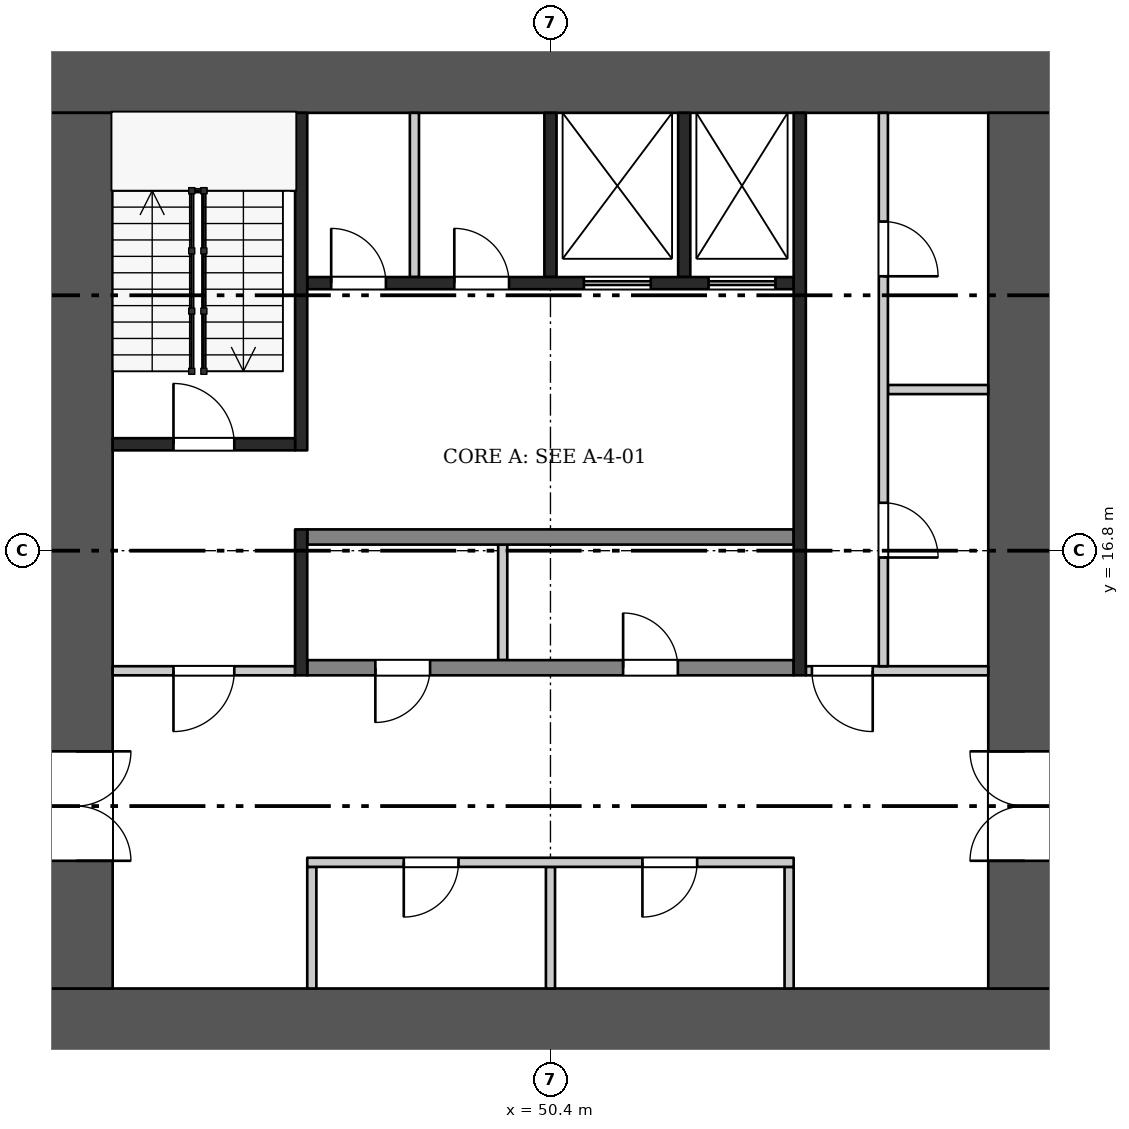
"""IFC4 building model, lengths in metres.
Left out: names, types, materials, properties, quantities, classifications, styles, units other than length and angle.
Written with IfcOpenShell. Run it as: python <this file> out.ifc"""

import sys

from ifc_helpers import new_model, si_unit, direction, frame, frame_2d, origin, place, context, subcontext, project, spatial, rectangle, extrude, element, fill, save


model = new_model("IFC4")
c1 = context("Model", 3, precision=1e-05, world=origin(), true_north=direction((0.0, 1.0)))
c2 = subcontext(c1, "Body", "Model", "MODEL_VIEW")
j1 = project(units=[si_unit("LENGTHUNIT", "METRE"), si_unit("PLANEANGLEUNIT", "RADIAN")], contexts=[c1])
p1 = place(None, origin())
s1 = spatial("IfcSite", under=j1, at=p1, CompositionType="ELEMENT")
p2 = place(p1, origin())
s2 = spatial("IfcBuilding", under=s1, at=p2, CompositionType="ELEMENT")
p3 = place(p2, frame((0.0, 0.0, -16.0)))
s3 = spatial("IfcBuildingStorey", under=s2, at=p3, CompositionType="ELEMENT", Elevation=-16.0)
for number, where, z_axis, x_axis in (
    (1, (42.0, 9.0, 0.0), (0.0, 0.0, 1.0), (1.0, 0.0, 0.0)),
    (2, (42.0, 24.6, 0.0), (0.0, 0.0, 1.0), (1.0, 0.0, 0.0)),
):
    element("IfcWall", number, at=place(p3, frame(where, z_axis=z_axis, x_axis=x_axis)), inside=s3, PredefinedType="SHEAR", context=c2, shape_type="SweptSolid", body=[
        extrude(rectangle(XDim=16.8, YDim=1.2, at=frame_2d((8.4, 0.0))), origin(), (0.0, 0.0, 1.0), 3.7),
    ])
p4 = place(p3, frame((42.6, 9.6, 0.0), z_axis=(0.0, 0.0, 1.0), x_axis=(0.0, 1.0, 0.0)))
e3 = element("IfcWall", 3, at=p4, inside=s3, PredefinedType="SHEAR", context=c2, shape_type="SweptSolid", body=[
    extrude(rectangle(XDim=14.4, YDim=1.2, at=frame_2d((7.2, 0.0))), origin(), (0.0, 0.0, 1.0), 3.7),
])
p5 = place(p4, frame((2.1, 0.0, 0.0)))
e4 = element("IfcOpeningElement", 4, at=p5, cuts=e3, PredefinedType="OPENING", context=c2, shape_type="SweptSolid", body=[
    extrude(rectangle(XDim=1.8, YDim=2.1, at=frame_2d((0.9, 1.05))), frame((0.0, 0.61, 0.0), z_axis=(0.0, -1.0, 0.0), x_axis=(1.0, 0.0, 0.0)), (0.0, 0.0, 1.0), 1.22),
])
p6 = place(p3, frame((58.2, 9.6, 0.0), z_axis=(0.0, 0.0, 1.0), x_axis=(0.0, 1.0, 0.0)))
e5 = element("IfcWall", 5, at=p6, inside=s3, PredefinedType="SHEAR", context=c2, shape_type="SweptSolid", body=[
    extrude(rectangle(XDim=14.4, YDim=1.2, at=frame_2d((7.2, 0.0))), origin(), (0.0, 0.0, 1.0), 3.7),
])
p7 = place(p6, frame((2.1, 0.0, 0.0)))
e6 = element("IfcOpeningElement", 6, at=p7, cuts=e5, PredefinedType="OPENING", context=c2, shape_type="SweptSolid", body=[
    extrude(rectangle(XDim=1.8, YDim=2.1, at=frame_2d((0.9, 1.05))), frame((0.0, 0.61, 0.0), z_axis=(0.0, -1.0, 0.0), x_axis=(1.0, 0.0, 0.0)), (0.0, 0.0, 1.0), 1.22),
])
for number, where, z_axis, x_axis in (
    (7, (46.475, 9.6, 0.0), (0.0, 0.0, 1.0), (0.0, 1.0, 0.0)),
    (8, (54.325, 9.6, 0.0), (0.0, 0.0, 1.0), (0.0, 1.0, 0.0)),
    (9, (50.4, 9.6, 0.0), (0.0, 0.0, 1.0), (0.0, 1.0, 0.0)),
):
    element("IfcWall", number, at=place(p3, frame(where, z_axis=z_axis, x_axis=x_axis)), inside=s3, PredefinedType="PARTITIONING", context=c2, shape_type="SweptSolid", body=[
        extrude(rectangle(XDim=2.0, YDim=0.15, at=frame_2d((1.0, 0.0))), origin(), (0.0, 0.0, 1.0), 3.7),
    ])
p8 = place(p3, frame((46.4, 11.675, 0.0), z_axis=(0.0, 0.0, 1.0), x_axis=(1.0, 0.0, 0.0)))
e10 = element("IfcWall", 10, at=p8, inside=s3, PredefinedType="PARTITIONING", context=c2, shape_type="SweptSolid", body=[
    extrude(rectangle(XDim=8.0, YDim=0.15, at=frame_2d((4.0, 0.0))), origin(), (0.0, 0.0, 1.0), 3.7),
])
p9 = place(p8, frame((1.587, 0.0, 0.0)))
e11 = element("IfcOpeningElement", 11, at=p9, cuts=e10, PredefinedType="OPENING", context=c2, shape_type="SweptSolid", body=[
    extrude(rectangle(XDim=0.9, YDim=2.1, at=frame_2d((0.45, 1.05))), frame((0.0, 0.085, 0.0), z_axis=(0.0, -1.0, 0.0), x_axis=(1.0, 0.0, 0.0)), (0.0, 0.0, 1.0), 0.17),
])
p10 = place(p8, frame((5.512, 0.0, 0.0)))
e12 = element("IfcOpeningElement", 12, at=p10, cuts=e10, PredefinedType="OPENING", context=c2, shape_type="SweptSolid", body=[
    extrude(rectangle(XDim=0.9, YDim=2.1, at=frame_2d((0.45, 1.05))), frame((0.0, 0.085, 0.0), z_axis=(0.0, -1.0, 0.0), x_axis=(1.0, 0.0, 0.0)), (0.0, 0.0, 1.0), 0.17),
])
p11 = place(p3, frame((49.615, 15.0, 0.0), z_axis=(0.0, 0.0, 1.0), x_axis=(0.0, 1.0, 0.0)))
e13 = element("IfcWall", 13, at=p11, inside=s3, PredefinedType="PARTITIONING", context=c2, shape_type="SweptSolid", body=[
    extrude(rectangle(XDim=1.9, YDim=0.15, at=frame_2d((0.95, 0.0))), origin(), (0.0, 0.0, 1.0), 3.7),
])
p12 = place(p3, frame((46.4, 14.875, 0.0), z_axis=(0.0, 0.0, 1.0), x_axis=(1.0, 0.0, 0.0)))
e14 = element("IfcWall", 14, at=p12, inside=s3, PredefinedType="SHEAR", context=c2, shape_type="SweptSolid", body=[
    extrude(rectangle(XDim=8.0, YDim=0.25, at=frame_2d((4.0, 0.0))), origin(), (0.0, 0.0, 1.0), 3.7),
])
p13 = place(p12, frame((1.12, 0.0, 0.0)))
e15 = element("IfcOpeningElement", 15, at=p13, cuts=e14, PredefinedType="OPENING", context=c2, shape_type="SweptSolid", body=[
    extrude(rectangle(XDim=0.9, YDim=2.1, at=frame_2d((0.45, 1.05))), frame((0.0, 0.135, 0.0), z_axis=(0.0, -1.0, 0.0), x_axis=(1.0, 0.0, 0.0)), (0.0, 0.0, 1.0), 0.27),
])
p14 = place(p12, frame((5.195, 0.0, 0.0)))
e16 = element("IfcOpeningElement", 16, at=p14, cuts=e14, PredefinedType="OPENING", context=c2, shape_type="SweptSolid", body=[
    extrude(rectangle(XDim=0.9, YDim=2.1, at=frame_2d((0.45, 1.05))), frame((0.0, 0.135, 0.0), z_axis=(0.0, -1.0, 0.0), x_axis=(1.0, 0.0, 0.0)), (0.0, 0.0, 1.0), 0.27),
])
p15 = place(p3, frame((46.4, 17.025, 0.0), z_axis=(0.0, 0.0, 1.0), x_axis=(1.0, 0.0, 0.0)))
e17 = element("IfcWall", 17, at=p15, inside=s3, PredefinedType="SHEAR", context=c2, shape_type="SweptSolid", body=[
    extrude(rectangle(XDim=8.0, YDim=0.25, at=frame_2d((4.0, 0.0))), origin(), (0.0, 0.0, 1.0), 3.7),
])
for number, where, z_axis, x_axis in (
    (18, (50.4, 21.3, 0.0), (0.0, 0.0, 1.0), (0.0, 1.0, 0.0)),
    (19, (52.6, 21.3, 0.0), (0.0, 0.0, 1.0), (0.0, 1.0, 0.0)),
):
    element("IfcWall", number, at=place(p3, frame(where, z_axis=z_axis, x_axis=x_axis)), inside=s3, PredefinedType="SHEAR", context=c2, shape_type="SweptSolid", body=[
        extrude(rectangle(XDim=2.7, YDim=0.2, at=frame_2d((1.35, 0.0))), origin(), (0.0, 0.0, 1.0), 3.7),
    ])
p16 = place(p3, frame((48.163, 21.3, 0.0), z_axis=(0.0, 0.0, 1.0), x_axis=(0.0, 1.0, 0.0)))
e20 = element("IfcWall", 20, at=p16, inside=s3, PredefinedType="PARTITIONING", context=c2, shape_type="SweptSolid", body=[
    extrude(rectangle(XDim=2.7, YDim=0.15, at=frame_2d((1.35, 0.0))), origin(), (0.0, 0.0, 1.0), 3.7),
])
p17 = place(p3, frame((46.4, 21.2, 0.0), z_axis=(0.0, 0.0, 1.0), x_axis=(1.0, 0.0, 0.0)))
e21 = element("IfcWall", 21, at=p17, inside=s3, PredefinedType="SHEAR", context=c2, shape_type="SweptSolid", body=[
    extrude(rectangle(XDim=8.0, YDim=0.2, at=frame_2d((4.0, 0.0))), origin(), (0.0, 0.0, 1.0), 3.7),
])
p18 = place(p17, frame((0.394, 0.0, 0.0)))
e22 = element("IfcOpeningElement", 22, at=p18, cuts=e21, PredefinedType="OPENING", context=c2, shape_type="SweptSolid", body=[
    extrude(rectangle(XDim=0.9, YDim=2.1, at=frame_2d((0.45, 1.05))), frame((0.0, 0.11, 0.0), z_axis=(0.0, -1.0, 0.0), x_axis=(1.0, 0.0, 0.0)), (0.0, 0.0, 1.0), 0.22),
])
p19 = place(p17, frame((2.419, 0.0, 0.0)))
e23 = element("IfcOpeningElement", 23, at=p19, cuts=e21, PredefinedType="OPENING", context=c2, shape_type="SweptSolid", body=[
    extrude(rectangle(XDim=0.9, YDim=2.1, at=frame_2d((0.45, 1.05))), frame((0.0, 0.11, 0.0), z_axis=(0.0, -1.0, 0.0), x_axis=(1.0, 0.0, 0.0)), (0.0, 0.0, 1.0), 0.22),
])
p20 = place(p17, frame((4.55, 0.0, 0.0)))
e24 = element("IfcOpeningElement", 24, at=p20, cuts=e21, PredefinedType="OPENING", context=c2, shape_type="SweptSolid", body=[
    extrude(rectangle(XDim=1.1, YDim=2.1, at=frame_2d((0.55, 1.05))), frame((0.0, 0.11, 0.0), z_axis=(0.0, -1.0, 0.0), x_axis=(1.0, 0.0, 0.0)), (0.0, 0.0, 1.0), 0.22),
])
p21 = place(p17, frame((6.6, 0.0, 0.0)))
e25 = element("IfcOpeningElement", 25, at=p21, cuts=e21, PredefinedType="OPENING", context=c2, shape_type="SweptSolid", body=[
    extrude(rectangle(XDim=1.1, YDim=2.1, at=frame_2d((0.55, 1.05))), frame((0.0, 0.11, 0.0), z_axis=(0.0, -1.0, 0.0), x_axis=(1.0, 0.0, 0.0)), (0.0, 0.0, 1.0), 0.22),
])
p22 = place(p3, frame((46.3, 14.75, 0.0), z_axis=(0.0, 0.0, 1.0), x_axis=(0.0, 1.0, 0.0)))
e26 = element("IfcWall", 26, at=p22, inside=s3, PredefinedType="SHEAR", context=c2, shape_type="SweptSolid", body=[
    extrude(rectangle(XDim=2.4, YDim=0.2, at=frame_2d((1.2, 0.0))), origin(), (0.0, 0.0, 1.0), 3.7),
])
p23 = place(p3, frame((46.3, 18.45, 0.0), z_axis=(0.0, 0.0, 1.0), x_axis=(0.0, 1.0, 0.0)))
e27 = element("IfcWall", 27, at=p23, inside=s3, PredefinedType="SHEAR", context=c2, shape_type="SweptSolid", body=[
    extrude(rectangle(XDim=5.55, YDim=0.2, at=frame_2d((2.775, 0.0))), origin(), (0.0, 0.0, 1.0), 3.7),
])
p24 = place(p3, frame((43.2, 14.825, 0.0), z_axis=(0.0, 0.0, 1.0), x_axis=(1.0, 0.0, 0.0)))
e28 = element("IfcWall", 28, at=p24, inside=s3, PredefinedType="PARTITIONING", context=c2, shape_type="SweptSolid", body=[
    extrude(rectangle(XDim=3.0, YDim=0.15, at=frame_2d((1.5, 0.0))), origin(), (0.0, 0.0, 1.0), 3.7),
])
p25 = place(p24, frame((1.0, 0.0, 0.0)))
e29 = element("IfcOpeningElement", 29, at=p25, cuts=e28, PredefinedType="OPENING", context=c2, shape_type="SweptSolid", body=[
    extrude(rectangle(XDim=1.0, YDim=2.1, at=frame_2d((0.5, 1.05))), frame((0.0, 0.085, 0.0), z_axis=(0.0, -1.0, 0.0), x_axis=(1.0, 0.0, 0.0)), (0.0, 0.0, 1.0), 0.17),
])
p26 = place(p3, frame((43.2, 18.55, 0.0), z_axis=(0.0, 0.0, 1.0), x_axis=(1.0, 0.0, 0.0)))
e30 = element("IfcWall", 30, at=p26, inside=s3, PredefinedType="SHEAR", context=c2, shape_type="SweptSolid", body=[
    extrude(rectangle(XDim=3.0, YDim=0.2, at=frame_2d((1.5, 0.0))), origin(), (0.0, 0.0, 1.0), 3.7),
])
p27 = place(p26, frame((1.0, 0.0, 0.0)))
e31 = element("IfcOpeningElement", 31, at=p27, cuts=e30, PredefinedType="OPENING", context=c2, shape_type="SweptSolid", body=[
    extrude(rectangle(XDim=1.0, YDim=2.1, at=frame_2d((0.5, 1.05))), frame((0.0, 0.11, 0.0), z_axis=(0.0, -1.0, 0.0), x_axis=(1.0, 0.0, 0.0)), (0.0, 0.0, 1.0), 0.22),
])
p28 = place(p3, frame((54.5, 14.75, 0.0), z_axis=(0.0, 0.0, 1.0), x_axis=(0.0, 1.0, 0.0)))
e32 = element("IfcWall", 32, at=p28, inside=s3, PredefinedType="SHEAR", context=c2, shape_type="SweptSolid", body=[
    extrude(rectangle(XDim=9.25, YDim=0.2, at=frame_2d((4.625, 0.0))), origin(), (0.0, 0.0, 1.0), 3.7),
])
p29 = place(p3, frame((54.6, 14.825, 0.0), z_axis=(0.0, 0.0, 1.0), x_axis=(1.0, 0.0, 0.0)))
e33 = element("IfcWall", 33, at=p29, inside=s3, PredefinedType="PARTITIONING", context=c2, shape_type="SweptSolid", body=[
    extrude(rectangle(XDim=3.0, YDim=0.15, at=frame_2d((1.5, 0.0))), origin(), (0.0, 0.0, 1.0), 3.7),
])
p30 = place(p29, frame((0.1, 0.0, 0.0)))
e34 = element("IfcOpeningElement", 34, at=p30, cuts=e33, PredefinedType="OPENING", context=c2, shape_type="SweptSolid", body=[
    extrude(rectangle(XDim=1.0, YDim=2.1, at=frame_2d((0.5, 1.05))), frame((0.0, 0.085, 0.0), z_axis=(0.0, -1.0, 0.0), x_axis=(1.0, 0.0, 0.0)), (0.0, 0.0, 1.0), 0.17),
])
p31 = place(p3, frame((55.95, 19.45, 0.0), z_axis=(0.0, 0.0, 1.0), x_axis=(1.0, 0.0, 0.0)))
e35 = element("IfcWall", 35, at=p31, inside=s3, PredefinedType="PARTITIONING", context=c2, shape_type="SweptSolid", body=[
    extrude(rectangle(XDim=1.65, YDim=0.15, at=frame_2d((0.825, 0.0))), origin(), (0.0, 0.0, 1.0), 3.7),
])
p32 = place(p3, frame((55.875, 14.9, 0.0), z_axis=(0.0, 0.0, 1.0), x_axis=(0.0, 1.0, 0.0)))
e36 = element("IfcWall", 36, at=p32, inside=s3, PredefinedType="PARTITIONING", context=c2, shape_type="SweptSolid", body=[
    extrude(rectangle(XDim=9.1, YDim=0.15, at=frame_2d((4.55, 0.0))), origin(), (0.0, 0.0, 1.0), 3.7),
])
p33 = place(p32, frame((1.788, 0.0, 0.0)))
e37 = element("IfcOpeningElement", 37, at=p33, cuts=e36, PredefinedType="OPENING", context=c2, shape_type="SweptSolid", body=[
    extrude(rectangle(XDim=0.9, YDim=2.1, at=frame_2d((0.45, 1.05))), frame((0.0, 0.085, 0.0), z_axis=(0.0, -1.0, 0.0), x_axis=(1.0, 0.0, 0.0)), (0.0, 0.0, 1.0), 0.17),
])
p34 = place(p32, frame((6.413, 0.0, 0.0)))
e38 = element("IfcOpeningElement", 38, at=p34, cuts=e36, PredefinedType="OPENING", context=c2, shape_type="SweptSolid", body=[
    extrude(rectangle(XDim=0.9, YDim=2.1, at=frame_2d((0.45, 1.05))), frame((0.0, 0.085, 0.0), z_axis=(0.0, -1.0, 0.0), x_axis=(1.0, 0.0, 0.0)), (0.0, 0.0, 1.0), 0.17),
])
p35 = place(p5, frame((1.8, 0.0, 0.0), z_axis=(0.0, 0.0, 1.0), x_axis=(-1.0, 0.0, 0.0)))
e39 = element("IfcDoor", 39, at=p35, inside=s3, OperationType="DOUBLE_DOOR_SINGLE_SWING", PredefinedType="DOOR", context=c2, shape_type="SweptSolid", body=[
    extrude(rectangle(XDim=1.8, YDim=2.1, at=frame_2d((0.9, 1.05))), frame((0.0, 0.025, 0.0), z_axis=(0.0, -1.0, 0.0), x_axis=(1.0, 0.0, 0.0)), (0.0, 0.0, 1.0), 0.05),
])
fill(e4, e39)
p36 = place(p7, origin())
e40 = element("IfcDoor", 40, at=p36, inside=s3, OperationType="DOUBLE_DOOR_SINGLE_SWING", PredefinedType="DOOR", context=c2, shape_type="SweptSolid", body=[
    extrude(rectangle(XDim=1.8, YDim=2.1, at=frame_2d((0.9, 1.05))), frame((0.0, 0.025, 0.0), z_axis=(0.0, -1.0, 0.0), x_axis=(1.0, 0.0, 0.0)), (0.0, 0.0, 1.0), 0.05),
])
fill(e6, e40)
p37 = place(p9, frame((0.9, 0.0, 0.0), z_axis=(0.0, 0.0, 1.0), x_axis=(-1.0, 0.0, 0.0)))
e41 = element("IfcDoor", 41, at=p37, inside=s3, OperationType="SINGLE_SWING_RIGHT", PredefinedType="DOOR", context=c2, shape_type="SweptSolid", body=[
    extrude(rectangle(XDim=0.9, YDim=2.1, at=frame_2d((0.45, 1.05))), frame((0.0, 0.025, 0.0), z_axis=(0.0, -1.0, 0.0), x_axis=(1.0, 0.0, 0.0)), (0.0, 0.0, 1.0), 0.05),
])
fill(e11, e41)
p38 = place(p10, frame((0.9, 0.0, 0.0), z_axis=(0.0, 0.0, 1.0), x_axis=(-1.0, 0.0, 0.0)))
e42 = element("IfcDoor", 42, at=p38, inside=s3, OperationType="SINGLE_SWING_RIGHT", PredefinedType="DOOR", context=c2, shape_type="SweptSolid", body=[
    extrude(rectangle(XDim=0.9, YDim=2.1, at=frame_2d((0.45, 1.05))), frame((0.0, 0.025, 0.0), z_axis=(0.0, -1.0, 0.0), x_axis=(1.0, 0.0, 0.0)), (0.0, 0.0, 1.0), 0.05),
])
fill(e12, e42)
p39 = place(p13, frame((0.9, 0.0, 0.0), z_axis=(0.0, 0.0, 1.0), x_axis=(-1.0, 0.0, 0.0)))
e43 = element("IfcDoor", 43, at=p39, inside=s3, OperationType="SINGLE_SWING_RIGHT", PredefinedType="DOOR", context=c2, shape_type="SweptSolid", body=[
    extrude(rectangle(XDim=0.9, YDim=2.1, at=frame_2d((0.45, 1.05))), frame((0.0, 0.025, 0.0), z_axis=(0.0, -1.0, 0.0), x_axis=(1.0, 0.0, 0.0)), (0.0, 0.0, 1.0), 0.05),
])
fill(e15, e43)
p40 = place(p14, origin())
e44 = element("IfcDoor", 44, at=p40, inside=s3, OperationType="SINGLE_SWING_LEFT", PredefinedType="DOOR", context=c2, shape_type="SweptSolid", body=[
    extrude(rectangle(XDim=0.9, YDim=2.1, at=frame_2d((0.45, 1.05))), frame((0.0, 0.025, 0.0), z_axis=(0.0, -1.0, 0.0), x_axis=(1.0, 0.0, 0.0)), (0.0, 0.0, 1.0), 0.05),
])
fill(e16, e44)
p41 = place(p18, origin())
e45 = element("IfcDoor", 45, at=p41, inside=s3, OperationType="SINGLE_SWING_LEFT", PredefinedType="DOOR", context=c2, shape_type="SweptSolid", body=[
    extrude(rectangle(XDim=0.9, YDim=2.1, at=frame_2d((0.45, 1.05))), frame((0.0, 0.025, 0.0), z_axis=(0.0, -1.0, 0.0), x_axis=(1.0, 0.0, 0.0)), (0.0, 0.0, 1.0), 0.05),
])
fill(e22, e45)
p42 = place(p19, origin())
e46 = element("IfcDoor", 46, at=p42, inside=s3, OperationType="SINGLE_SWING_LEFT", PredefinedType="DOOR", context=c2, shape_type="SweptSolid", body=[
    extrude(rectangle(XDim=0.9, YDim=2.1, at=frame_2d((0.45, 1.05))), frame((0.0, 0.025, 0.0), z_axis=(0.0, -1.0, 0.0), x_axis=(1.0, 0.0, 0.0)), (0.0, 0.0, 1.0), 0.05),
])
fill(e23, e46)
p43 = place(p20, origin())
e47 = element("IfcDoor", 47, at=p43, inside=s3, OperationType="DOUBLE_DOOR_SLIDING", PredefinedType="DOOR", context=c2, shape_type="SweptSolid", body=[
    extrude(rectangle(XDim=1.1, YDim=2.1, at=frame_2d((0.55, 1.05))), frame((0.0, 0.025, 0.0), z_axis=(0.0, -1.0, 0.0), x_axis=(1.0, 0.0, 0.0)), (0.0, 0.0, 1.0), 0.05),
])
fill(e24, e47)
p44 = place(p21, origin())
e48 = element("IfcDoor", 48, at=p44, inside=s3, OperationType="DOUBLE_DOOR_SLIDING", PredefinedType="DOOR", context=c2, shape_type="SweptSolid", body=[
    extrude(rectangle(XDim=1.1, YDim=2.1, at=frame_2d((0.55, 1.05))), frame((0.0, 0.025, 0.0), z_axis=(0.0, -1.0, 0.0), x_axis=(1.0, 0.0, 0.0)), (0.0, 0.0, 1.0), 0.05),
])
fill(e25, e48)
p45 = place(p25, frame((1.0, 0.0, 0.0), z_axis=(0.0, 0.0, 1.0), x_axis=(-1.0, 0.0, 0.0)))
e49 = element("IfcDoor", 49, at=p45, inside=s3, OperationType="SINGLE_SWING_RIGHT", PredefinedType="DOOR", context=c2, shape_type="SweptSolid", body=[
    extrude(rectangle(XDim=1.0, YDim=2.1, at=frame_2d((0.5, 1.05))), frame((0.0, 0.025, 0.0), z_axis=(0.0, -1.0, 0.0), x_axis=(1.0, 0.0, 0.0)), (0.0, 0.0, 1.0), 0.05),
])
fill(e29, e49)
p46 = place(p27, origin())
e50 = element("IfcDoor", 50, at=p46, inside=s3, OperationType="SINGLE_SWING_LEFT", PredefinedType="DOOR", context=c2, shape_type="SweptSolid", body=[
    extrude(rectangle(XDim=1.0, YDim=2.1, at=frame_2d((0.5, 1.05))), frame((0.0, 0.025, 0.0), z_axis=(0.0, -1.0, 0.0), x_axis=(1.0, 0.0, 0.0)), (0.0, 0.0, 1.0), 0.05),
])
fill(e31, e50)
p47 = place(p30, frame((1.0, 0.0, 0.0), z_axis=(0.0, 0.0, 1.0), x_axis=(-1.0, 0.0, 0.0)))
e51 = element("IfcDoor", 51, at=p47, inside=s3, OperationType="SINGLE_SWING_LEFT", PredefinedType="DOOR", context=c2, shape_type="SweptSolid", body=[
    extrude(rectangle(XDim=1.0, YDim=2.1, at=frame_2d((0.5, 1.05))), frame((0.0, 0.025, 0.0), z_axis=(0.0, -1.0, 0.0), x_axis=(1.0, 0.0, 0.0)), (0.0, 0.0, 1.0), 0.05),
])
fill(e34, e51)
p48 = place(p33, frame((0.9, 0.0, 0.0), z_axis=(0.0, 0.0, 1.0), x_axis=(-1.0, 0.0, 0.0)))
e52 = element("IfcDoor", 52, at=p48, inside=s3, OperationType="SINGLE_SWING_RIGHT", PredefinedType="DOOR", context=c2, shape_type="SweptSolid", body=[
    extrude(rectangle(XDim=0.9, YDim=2.1, at=frame_2d((0.45, 1.05))), frame((0.0, 0.025, 0.0), z_axis=(0.0, -1.0, 0.0), x_axis=(1.0, 0.0, 0.0)), (0.0, 0.0, 1.0), 0.05),
])
fill(e37, e52)
p49 = place(p34, frame((0.9, 0.0, 0.0), z_axis=(0.0, 0.0, 1.0), x_axis=(-1.0, 0.0, 0.0)))
e53 = element("IfcDoor", 53, at=p49, inside=s3, OperationType="SINGLE_SWING_RIGHT", PredefinedType="DOOR", context=c2, shape_type="SweptSolid", body=[
    extrude(rectangle(XDim=0.9, YDim=2.1, at=frame_2d((0.45, 1.05))), frame((0.0, 0.025, 0.0), z_axis=(0.0, -1.0, 0.0), x_axis=(1.0, 0.0, 0.0)), (0.0, 0.0, 1.0), 0.05),
])
fill(e38, e53)
save(model, sys.argv[1])
